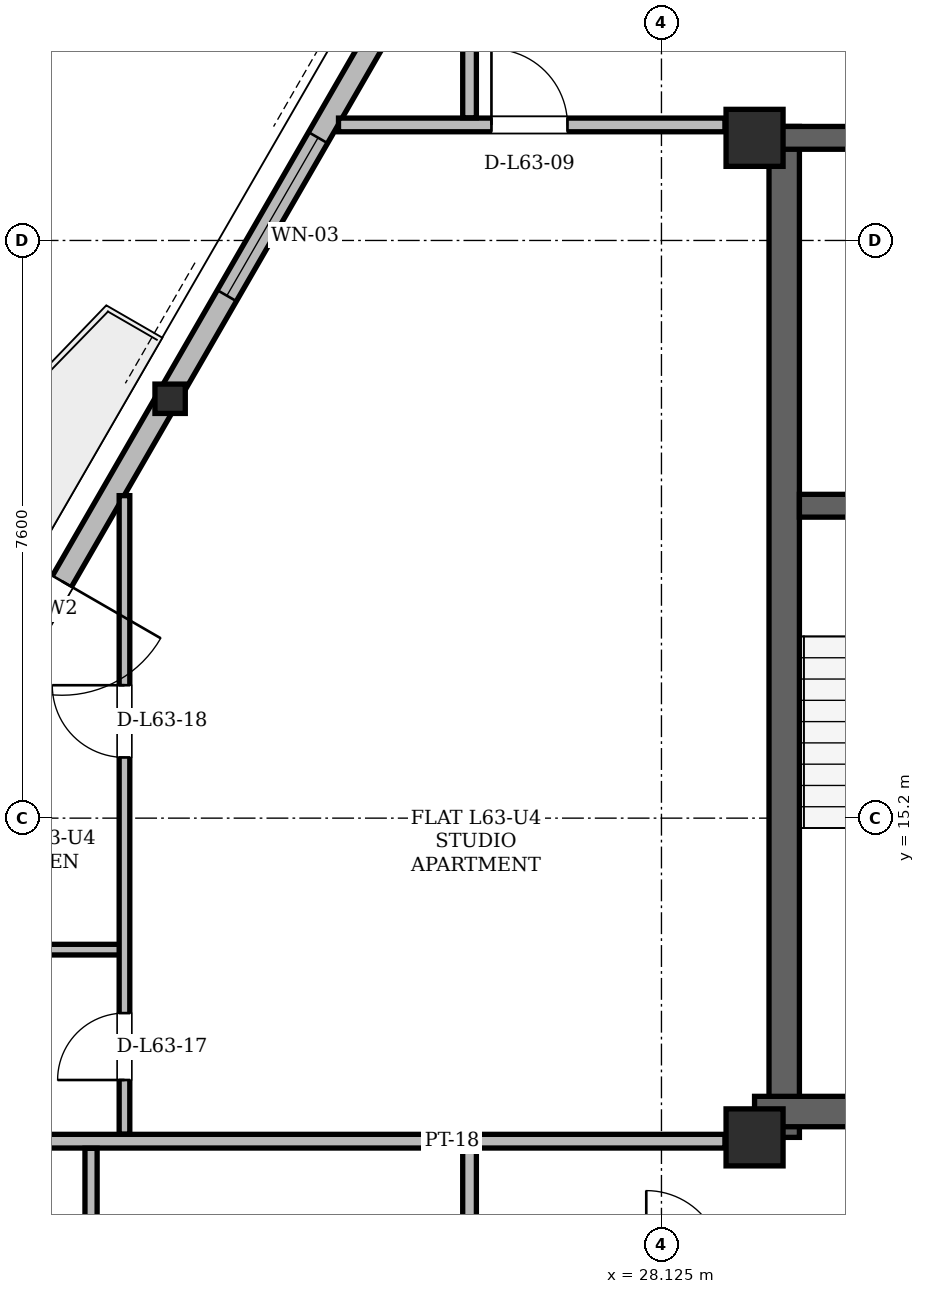
"""IFC4 building model, lengths in metres.
Left out: names, types, materials, properties, quantities, classifications, styles, units other than length and angle.
Written with IfcOpenShell. Run it as: python <this file> out.ifc"""

import sys

from ifc_helpers import new_model, si_unit, direction, frame, frame_2d, origin, origin_2d, place, context, subcontext, project, spatial, rectangle, hollow_rectangle, i_section, extrude, element, fill, save


model = new_model("IFC4")
c1 = context("Model", 3, precision=1e-05, world=origin(), true_north=direction((0.0, 1.0)))
c2 = subcontext(c1, "Body", "Model", "MODEL_VIEW")
j1 = project(units=[si_unit("LENGTHUNIT", "METRE"), si_unit("PLANEANGLEUNIT", "RADIAN")], contexts=[c1])
p1 = place(None, origin())
s1 = spatial("IfcSite", under=j1, at=p1, CompositionType="ELEMENT")
p2 = place(p1, origin())
s2 = spatial("IfcBuilding", under=s1, at=p2, CompositionType="ELEMENT")
p3 = place(p2, frame((0.0, 0.0, 237.9)))
s3 = spatial("IfcBuildingStorey", under=s2, at=p3, CompositionType="ELEMENT", Elevation=237.9)
for number, where, z_axis, x_axis in (
    (1, (29.35, 11.0, 0.0), (0.0, 0.0, 1.0), (1.0, 0.0, 0.0)),
    (2, (29.35, 24.15, 0.0), (0.0, 0.0, 1.0), (1.0, 0.0, 0.0)),
):
    element("IfcColumn", number, at=place(p3, frame(where, z_axis=z_axis, x_axis=x_axis)), inside=s3, PredefinedType="COLUMN", context=c2, shape_type="SweptSolid", body=[
        extrude(hollow_rectangle(XDim=0.75, YDim=0.75, WallThickness=0.06, at=origin_2d()), origin(), (0.0, 0.0, 1.0), 3.6),
    ])
p4 = place(p3, frame((21.635, 20.738, 0.005), z_axis=(0.013866832544, -0.011351769779, 0.999839411245), x_axis=(0.633444321555, 0.773788273037, 0.0)))
e3 = element("IfcColumn", 3, at=p4, inside=s3, PredefinedType="COLUMN", context=c2, shape_type="SweptSolid", body=[
    extrude(i_section(OverallWidth=0.399, OverallDepth=0.386, WebThickness=0.021, FlangeThickness=0.033, at=origin_2d()), origin(), (0.0, 0.0, 1.0), 3.592),
])
p5 = place(p3, frame((29.74, 11.0, 0.0), z_axis=(0.0, 0.0, 1.0), x_axis=(0.0, 1.0, 0.0)))
e4 = element("IfcWall", 4, at=p5, inside=s3, PredefinedType="SHEAR", context=c2, shape_type="SweptSolid", body=[
    extrude(rectangle(XDim=13.3, YDim=0.4, at=frame_2d((6.65, 0.0))), origin(), (0.0, 0.0, 1.0), 3.38),
])
p6 = place(p3, frame((29.35, 11.34, 0.0), z_axis=(0.0, 0.0, 1.0), x_axis=(1.0, 0.0, 0.0)))
e5 = element("IfcWall", 5, at=p6, inside=s3, PredefinedType="SHEAR", context=c2, shape_type="SweptSolid", body=[
    extrude(rectangle(XDim=7.1, YDim=0.4, at=frame_2d((3.55, 0.0))), origin(), (0.0, 0.0, 1.0), 3.38),
])
p7 = place(p3, frame((29.65, 24.15, 0.0), z_axis=(0.0, 0.0, 1.0), x_axis=(1.0, 0.0, 0.0)))
e6 = element("IfcWall", 6, at=p7, inside=s3, PredefinedType="SHEAR", context=c2, shape_type="SweptSolid", body=[
    extrude(rectangle(XDim=15.7, YDim=0.3, at=frame_2d((7.85, 0.0))), origin(), (0.0, 0.0, 1.0), 3.38),
])
p8 = place(p7, frame((1.7, 0.0, 0.0)))
e7 = element("IfcOpeningElement", 7, at=p8, cuts=e6, PredefinedType="OPENING", context=c2, shape_type="SweptSolid", body=[
    extrude(rectangle(XDim=1.2, YDim=2.2, at=frame_2d((0.6, 1.1))), frame((0.0, 0.15, 0.0), z_axis=(0.0, -1.0, 0.0), x_axis=(1.0, 0.0, 0.0)), (0.0, 0.0, 1.0), 0.3),
])
p9 = place(p7, frame((12.8, 0.0, 0.0)))
e8 = element("IfcOpeningElement", 8, at=p9, cuts=e6, PredefinedType="OPENING", context=c2, shape_type="SweptSolid", body=[
    extrude(rectangle(XDim=1.2, YDim=2.2, at=frame_2d((0.6, 1.1))), frame((0.0, 0.15, 0.0), z_axis=(0.0, -1.0, 0.0), x_axis=(1.0, 0.0, 0.0)), (0.0, 0.0, 1.0), 0.3),
])
p10 = place(p7, frame((7.4, 0.0, 0.0)))
e9 = element("IfcOpeningElement", 9, at=p10, cuts=e6, PredefinedType="OPENING", context=c2, shape_type="SweptSolid", body=[
    extrude(rectangle(XDim=0.9, YDim=2.05, at=frame_2d((0.45, 1.025))), frame((0.0, 0.15, 0.0), z_axis=(0.0, -1.0, 0.0), x_axis=(1.0, 0.0, 0.0)), (0.0, 0.0, 1.0), 0.3),
])
p11 = place(p3, frame((29.94, 19.31, 0.0), z_axis=(0.0, 0.0, 1.0), x_axis=(1.0, 0.0, 0.0)))
e10 = element("IfcWall", 10, at=p11, inside=s3, PredefinedType="SHEAR", context=c2, shape_type="SweptSolid", body=[
    extrude(rectangle(XDim=4.01, YDim=0.3, at=frame_2d((2.005, 0.0))), origin(), (0.0, 0.0, 1.0), 3.38),
])
p12 = place(p11, frame((1.01, 0.0, 0.0)))
e11 = element("IfcOpeningElement", 11, at=p12, cuts=e10, PredefinedType="OPENING", context=c2, shape_type="SweptSolid", body=[
    extrude(rectangle(XDim=1.4, YDim=2.2, at=frame_2d((0.7, 1.1))), frame((0.0, 0.15, 0.0), z_axis=(0.0, -1.0, 0.0), x_axis=(1.0, 0.0, 0.0)), (0.0, 0.0, 1.0), 0.3),
])
p13 = place(p3, frame((34.551, 43.107, 0.0), z_axis=(0.0, 0.0, 1.0), x_axis=(-0.500002325133, -0.866024061364, 0.0)))
e12 = element("IfcWall", 12, at=p13, inside=s3, PredefinedType="SOLIDWALL", context=c2, shape_type="SweptSolid", body=[
    extrude(rectangle(XDim=36.9, YDim=0.29, at=frame_2d((18.45, 0.0))), origin(), (0.0, 0.0, 1.0), 2.677),
])
p14 = place(p13, frame((3.429, 0.0, 0.0)))
e13 = element("IfcOpeningElement", 13, at=p14, cuts=e12, PredefinedType="OPENING", context=c2, shape_type="SweptSolid", body=[
    extrude(rectangle(XDim=1.5, YDim=2.2, at=frame_2d((0.75, 1.1))), frame((0.0, 0.145, 0.0), z_axis=(0.0, -1.0, 0.0), x_axis=(1.0, 0.0, 0.0)), (0.0, 0.0, 1.0), 0.29),
])
p15 = place(p13, frame((28.625, 0.0, 0.0)))
e14 = element("IfcOpeningElement", 14, at=p15, cuts=e12, PredefinedType="OPENING", context=c2, shape_type="SweptSolid", body=[
    extrude(rectangle(XDim=1.5, YDim=2.2, at=frame_2d((0.75, 1.1))), frame((0.0, 0.145, 0.0), z_axis=(0.0, -1.0, 0.0), x_axis=(1.0, 0.0, 0.0)), (0.0, 0.0, 1.0), 0.29),
])
p16 = place(p13, frame((21.887, 0.0, 0.85)))
e15 = element("IfcOpeningElement", 15, at=p16, cuts=e12, PredefinedType="OPENING", context=c2, shape_type="SweptSolid", body=[
    extrude(rectangle(XDim=2.4, YDim=1.717, at=frame_2d((1.2, 0.858))), frame((0.0, 0.145, 0.0), z_axis=(0.0, -1.0, 0.0), x_axis=(1.0, 0.0, 0.0)), (0.0, 0.0, 1.0), 0.29),
])
p17 = place(p13, frame((34.716, 0.0, 0.85)))
e16 = element("IfcOpeningElement", 16, at=p17, cuts=e12, PredefinedType="OPENING", context=c2, shape_type="SweptSolid", body=[
    extrude(rectangle(XDim=1.2, YDim=1.48, at=frame_2d((0.6, 0.74))), frame((0.0, 0.145, 0.0), z_axis=(0.0, -1.0, 0.0), x_axis=(1.0, 0.0, 0.0)), (0.0, 0.0, 1.0), 0.29),
])
p18 = place(p13, frame((32.59, 0.0, 0.85)))
e17 = element("IfcOpeningElement", 17, at=p18, cuts=e12, PredefinedType="OPENING", context=c2, shape_type="SweptSolid", body=[
    extrude(rectangle(XDim=1.2, YDim=1.48, at=frame_2d((0.6, 0.74))), frame((0.0, 0.145, 0.0), z_axis=(0.0, -1.0, 0.0), x_axis=(1.0, 0.0, 0.0)), (0.0, 0.0, 1.0), 0.29),
])
p19 = place(p13, frame((12.187, 0.0, 0.85)))
e18 = element("IfcOpeningElement", 18, at=p19, cuts=e12, PredefinedType="OPENING", context=c2, shape_type="SweptSolid", body=[
    extrude(rectangle(XDim=1.2, YDim=1.48, at=frame_2d((0.6, 0.74))), frame((0.0, 0.145, 0.0), z_axis=(0.0, -1.0, 0.0), x_axis=(1.0, 0.0, 0.0)), (0.0, 0.0, 1.0), 0.29),
])
p20 = place(p13, frame((16.565, 0.0, 0.85)))
e19 = element("IfcOpeningElement", 19, at=p20, cuts=e12, PredefinedType="OPENING", context=c2, shape_type="SweptSolid", body=[
    extrude(rectangle(XDim=2.0, YDim=1.717, at=frame_2d((1.0, 0.858))), frame((0.0, 0.145, 0.0), z_axis=(0.0, -1.0, 0.0), x_axis=(1.0, 0.0, 0.0)), (0.0, 0.0, 1.0), 0.29),
])
p21 = place(p13, frame((6.94, 0.0, 0.85)))
e20 = element("IfcOpeningElement", 20, at=p21, cuts=e12, PredefinedType="OPENING", context=c2, shape_type="SweptSolid", body=[
    extrude(rectangle(XDim=1.2, YDim=1.48, at=frame_2d((0.6, 0.74))), frame((0.0, 0.145, 0.0), z_axis=(0.0, -1.0, 0.0), x_axis=(1.0, 0.0, 0.0)), (0.0, 0.0, 1.0), 0.29),
])
p22 = place(p3, frame((16.487, 10.95, 0.0), z_axis=(0.0, 0.0, 1.0), x_axis=(1.0, 0.0, 0.0)))
e21 = element("IfcWall", 21, at=p22, inside=s3, PredefinedType="PARTITIONING", context=c2, shape_type="SweptSolid", body=[
    extrude(rectangle(XDim=12.473, YDim=0.18, at=frame_2d((6.237, 0.0))), origin(), (0.0, 0.0, 1.0), 2.913),
])
p23 = place(p3, frame((17.612, 13.47, 0.0), z_axis=(0.0, 0.0, 1.0), x_axis=(1.0, 0.0, 0.0)))
e22 = element("IfcWall", 22, at=p23, inside=s3, PredefinedType="PARTITIONING", context=c2, shape_type="SweptSolid", body=[
    extrude(rectangle(XDim=3.452, YDim=0.14, at=frame_2d((1.726, 0.0))), origin(), (0.0, 0.0, 1.0), 3.38),
])
p24 = place(p3, frame((23.876, 24.32, 0.0), z_axis=(0.0, 0.0, 1.0), x_axis=(1.0, 0.0, 0.0)))
e23 = element("IfcWall", 23, at=p24, inside=s3, PredefinedType="PARTITIONING", context=c2, shape_type="SweptSolid", body=[
    extrude(rectangle(XDim=5.084, YDim=0.18, at=frame_2d((2.542, 0.0))), origin(), (0.0, 0.0, 1.0), 3.38),
])
p25 = place(p24, frame((2.012, 0.0, 0.0)))
e24 = element("IfcOpeningElement", 24, at=p25, cuts=e23, PredefinedType="OPENING", context=c2, shape_type="SweptSolid", body=[
    extrude(rectangle(XDim=1.0, YDim=2.18, at=frame_2d((0.5, 1.09))), frame((0.0, 0.09, 0.0), z_axis=(0.0, -1.0, 0.0), x_axis=(1.0, 0.0, 0.0)), (0.0, 0.0, 1.0), 0.18),
])
p26 = place(p3, frame((20.62, 6.191, 0.0), z_axis=(0.0, 0.0, 1.0), x_axis=(0.0, 1.0, 0.0)))
e25 = element("IfcWall", 25, at=p26, inside=s3, PredefinedType="PARTITIONING", context=c2, shape_type="SweptSolid", body=[
    extrude(rectangle(XDim=4.665, YDim=0.16, at=frame_2d((2.333, 0.0))), origin(), (0.0, 0.0, 1.0), 2.913),
])
p27 = place(p26, frame((1.94, 0.0, 0.0)))
e26 = element("IfcOpeningElement", 26, at=p27, cuts=e25, PredefinedType="OPENING", context=c2, shape_type="SweptSolid", body=[
    extrude(rectangle(XDim=0.88, YDim=2.08, at=frame_2d((0.44, 1.04))), frame((0.0, 0.08, 0.0), z_axis=(0.0, -1.0, 0.0), x_axis=(1.0, 0.0, 0.0)), (0.0, 0.0, 1.0), 0.16),
])
p28 = place(p3, frame((21.06, 11.044, 0.0), z_axis=(0.0, 0.0, 1.0), x_axis=(0.0, 1.0, 0.0)))
e27 = element("IfcWall", 27, at=p28, inside=s3, PredefinedType="PARTITIONING", context=c2, shape_type="SweptSolid", body=[
    extrude(rectangle(XDim=8.399, YDim=0.14, at=frame_2d((4.199, 0.0))), origin(), (0.0, 0.0, 1.0), 3.38),
])
p29 = place(p28, frame((0.711, 0.0, 0.0)))
e28 = element("IfcOpeningElement", 28, at=p29, cuts=e27, PredefinedType="OPENING", context=c2, shape_type="SweptSolid", body=[
    extrude(rectangle(XDim=0.88, YDim=2.08, at=frame_2d((0.44, 1.04))), frame((0.0, 0.07, 0.0), z_axis=(0.0, -1.0, 0.0), x_axis=(1.0, 0.0, 0.0)), (0.0, 0.0, 1.0), 0.14),
])
p30 = place(p28, frame((4.955, 0.0, 0.0)))
e29 = element("IfcOpeningElement", 29, at=p30, cuts=e27, PredefinedType="OPENING", context=c2, shape_type="SweptSolid", body=[
    extrude(rectangle(XDim=0.95, YDim=2.1, at=frame_2d((0.475, 1.05))), frame((0.0, 0.07, 0.0), z_axis=(0.0, -1.0, 0.0), x_axis=(1.0, 0.0, 0.0)), (0.0, 0.0, 1.0), 0.14),
])
for number, where, z_axis, x_axis in (
    (30, (25.6, 9.394, 0.0), (0.0, 0.0, 1.0), (0.0, 1.0, 0.0)),
    (31, (25.6, 24.414, 0.0), (0.0, 0.0, 1.0), (0.0, 1.0, 0.0)),
):
    element("IfcWall", number, at=place(p3, frame(where, z_axis=z_axis, x_axis=x_axis)), inside=s3, PredefinedType="PARTITIONING", context=c2, shape_type="SweptSolid", body=[
        extrude(rectangle(XDim=1.462, YDim=0.18, at=frame_2d((0.731, 0.0))), origin(), (0.0, 0.0, 1.0), 3.38),
    ])
p31 = place(p15, origin())
e32 = element("IfcDoor", 32, at=p31, inside=s3, OperationType="SINGLE_SWING_LEFT", PredefinedType="DOOR", context=c2, shape_type="SweptSolid", body=[
    extrude(rectangle(XDim=1.5, YDim=2.2, at=frame_2d((0.75, 1.1))), frame((0.0, 0.025, 0.0), z_axis=(0.0, -1.0, 0.0), x_axis=(1.0, 0.0, 0.0)), (0.0, 0.0, 1.0), 0.05),
])
fill(e14, e32)
p32 = place(p16, origin())
e33 = element("IfcWindow", 33, at=p32, inside=s3, PartitioningType="SINGLE_PANEL", PredefinedType="WINDOW", context=c2, shape_type="SweptSolid", body=[
    extrude(rectangle(XDim=2.4, YDim=1.717, at=frame_2d((1.2, 0.858))), frame((0.0, 0.03, 0.0), z_axis=(0.0, -1.0, 0.0), x_axis=(1.0, 0.0, 0.0)), (0.0, 0.0, 1.0), 0.06),
])
fill(e15, e33)
p33 = place(p25, origin())
e34 = element("IfcDoor", 34, at=p33, inside=s3, OperationType="SINGLE_SWING_LEFT", PredefinedType="DOOR", context=c2, shape_type="SweptSolid", body=[
    extrude(rectangle(XDim=1.0, YDim=2.18, at=frame_2d((0.5, 1.09))), frame((0.0, 0.025, 0.0), z_axis=(0.0, -1.0, 0.0), x_axis=(1.0, 0.0, 0.0)), (0.0, 0.0, 1.0), 0.05),
])
fill(e24, e34)
p34 = place(p29, origin())
e35 = element("IfcDoor", 35, at=p34, inside=s3, OperationType="SINGLE_SWING_LEFT", PredefinedType="DOOR", context=c2, shape_type="SweptSolid", body=[
    extrude(rectangle(XDim=0.88, YDim=2.08, at=frame_2d((0.44, 1.04))), frame((0.0, 0.025, 0.0), z_axis=(0.0, -1.0, 0.0), x_axis=(1.0, 0.0, 0.0)), (0.0, 0.0, 1.0), 0.05),
])
fill(e28, e35)
p35 = place(p30, origin())
e36 = element("IfcDoor", 36, at=p35, inside=s3, OperationType="SINGLE_SWING_RIGHT", PredefinedType="DOOR", context=c2, shape_type="SweptSolid", body=[
    extrude(rectangle(XDim=0.95, YDim=2.1, at=frame_2d((0.475, 1.05))), frame((0.0, 0.025, 0.0), z_axis=(0.0, -1.0, 0.0), x_axis=(1.0, 0.0, 0.0)), (0.0, 0.0, 1.0), 0.05),
])
fill(e29, e36)
save(model, sys.argv[1])
